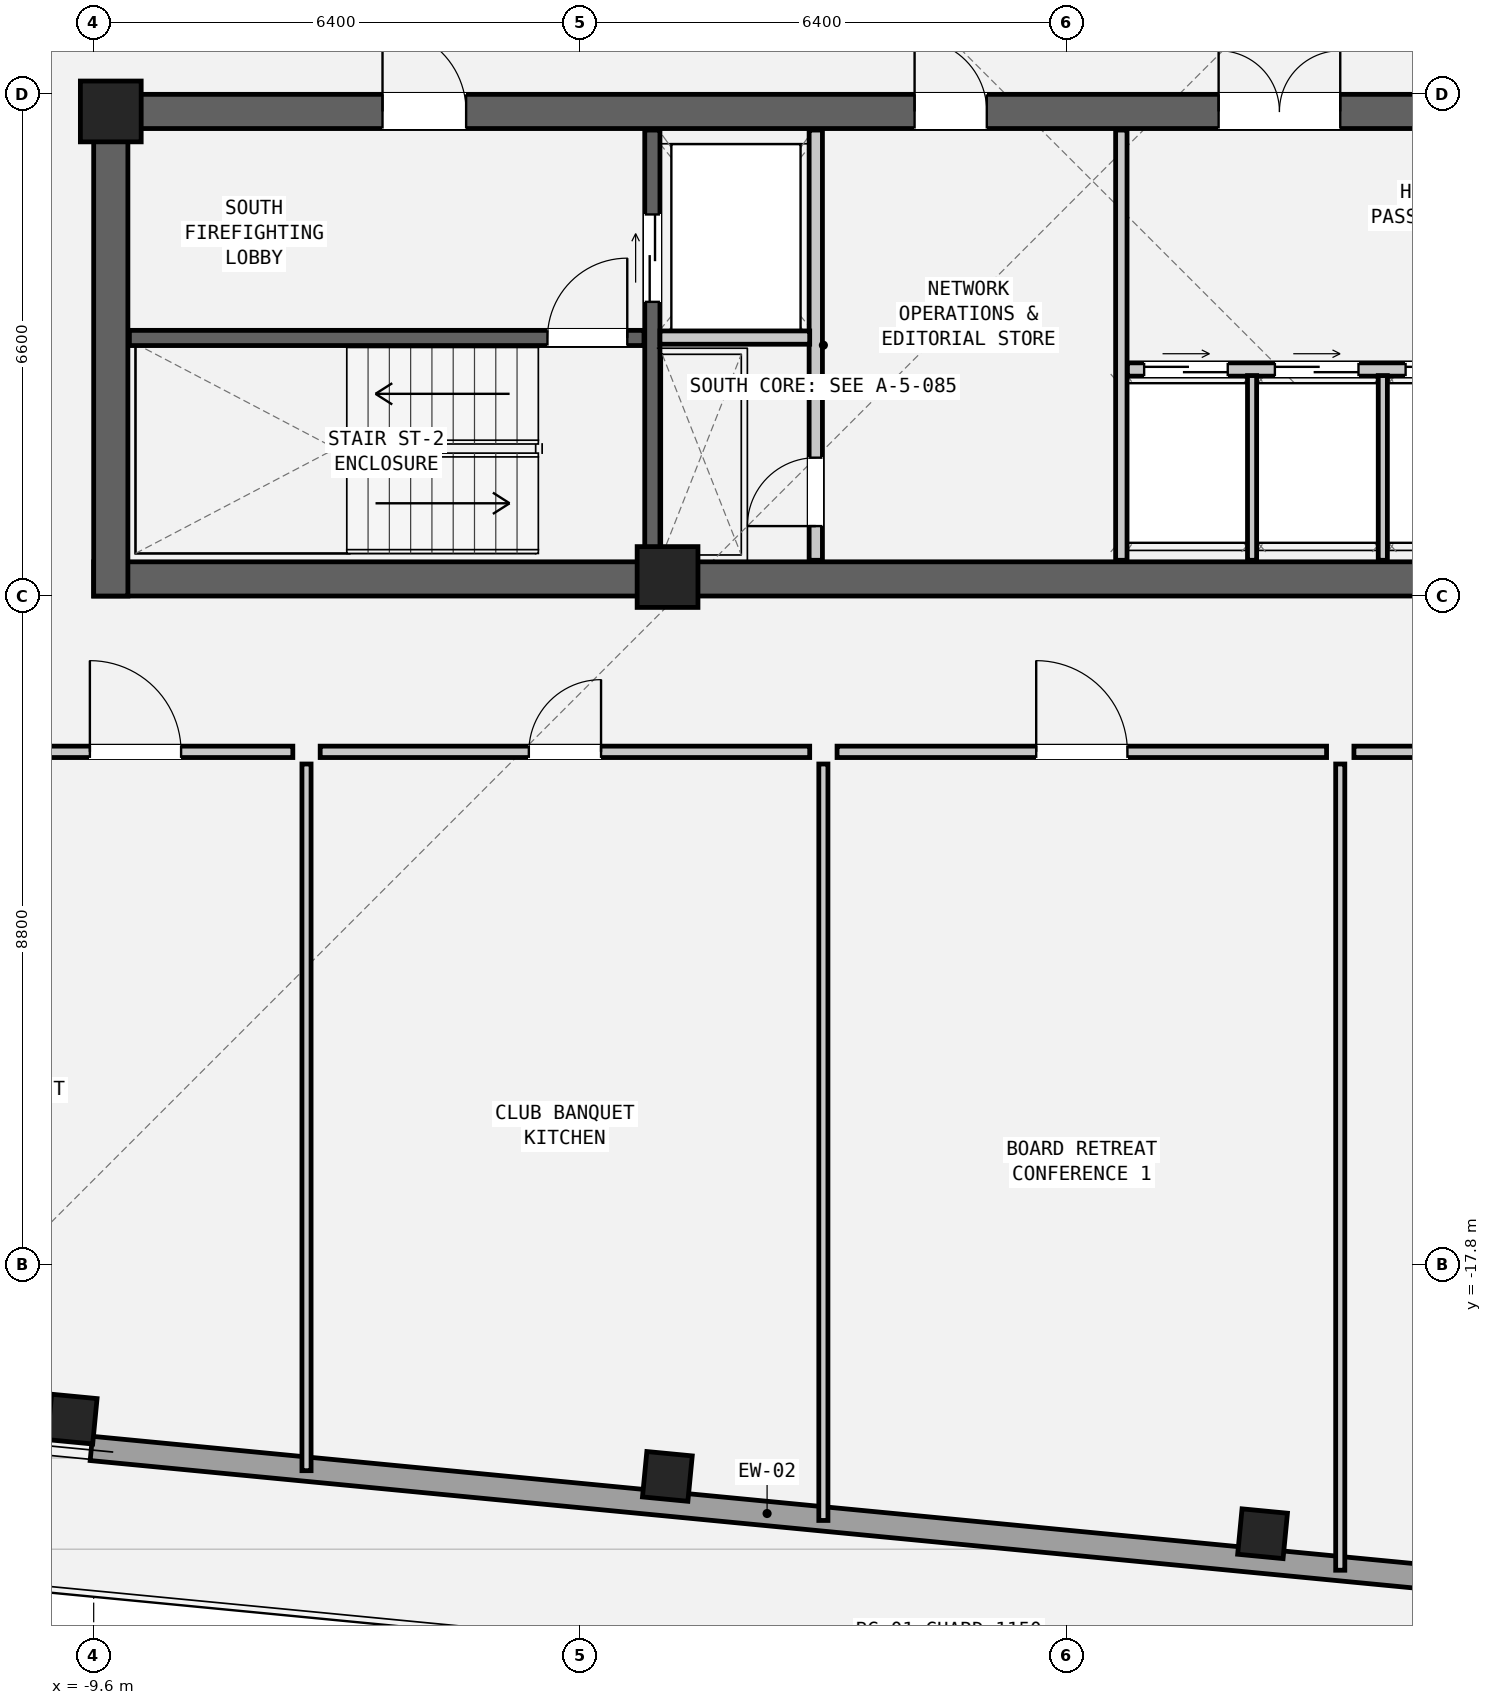
"""IFC4 building model, lengths in metres.
Left out: names, types, materials, properties, quantities, classifications, styles, units other than length and angle.
Written with IfcOpenShell. Run it as: python <this file> out.ifc"""

import sys

from ifc_helpers import new_model, si_unit, direction, frame, frame_2d, origin, origin_2d, place, context, subcontext, project, spatial, rectangle, hollow_rectangle, extrude, element, fill, save


model = new_model("IFC4")
c1 = context("Model", 3, precision=1e-05, world=origin(), true_north=direction((0.0, 1.0)))
c2 = subcontext(c1, "Body", "Model", "MODEL_VIEW")
j1 = project(units=[si_unit("LENGTHUNIT", "METRE"), si_unit("PLANEANGLEUNIT", "RADIAN")], contexts=[c1])
p1 = place(None, origin())
s1 = spatial("IfcSite", under=j1, at=p1, CompositionType="ELEMENT")
p2 = place(p1, origin())
s2 = spatial("IfcBuilding", under=s1, at=p2, CompositionType="ELEMENT")
p3 = place(p2, frame((0.0, 0.0, 276.95)))
s3 = spatial("IfcBuildingStorey", under=s2, at=p3, CompositionType="ELEMENT", Elevation=276.95)
p4 = place(p3, frame((-9.6, -8.775, 0.0), z_axis=(0.0, 0.0, 1.0), x_axis=(1.0, 0.0, 0.0)))
e1 = element("IfcWall", 1, at=p4, inside=s3, PredefinedType="SHEAR", context=c2, shape_type="SweptSolid", body=[
    extrude(rectangle(XDim=19.2, YDim=0.45, at=frame_2d((9.6, 0.0))), origin(), (0.0, 0.0, 1.0), 3.6),
])
p5 = place(p3, frame((-9.6, -2.625, 0.0), z_axis=(0.0, 0.0, 1.0), x_axis=(1.0, 0.0, 0.0)))
e2 = element("IfcWall", 2, at=p5, inside=s3, PredefinedType="SHEAR", context=c2, shape_type="SweptSolid", body=[
    extrude(rectangle(XDim=19.2, YDim=0.45, at=frame_2d((9.6, 0.0))), origin(), (0.0, 0.0, 1.0), 3.6),
])
p6 = place(p5, frame((3.8, 0.0, 0.0)))
e3 = element("IfcOpeningElement", 3, at=p6, cuts=e2, PredefinedType="OPENING", context=c2, shape_type="SweptSolid", body=[
    extrude(rectangle(XDim=1.1, YDim=2.08, at=frame_2d((0.55, 1.04))), frame((0.0, 0.237, 0.0), z_axis=(0.0, -1.0, 0.0), x_axis=(1.0, 0.0, 0.0)), (0.0, 0.0, 1.0), 0.474),
])
p7 = place(p5, frame((10.8, 0.0, 0.0)))
e4 = element("IfcOpeningElement", 4, at=p7, cuts=e2, PredefinedType="OPENING", context=c2, shape_type="SweptSolid", body=[
    extrude(rectangle(XDim=0.95, YDim=2.1, at=frame_2d((0.475, 1.05))), frame((0.0, 0.237, 0.0), z_axis=(0.0, -1.0, 0.0), x_axis=(1.0, 0.0, 0.0)), (0.0, 0.0, 1.0), 0.474),
])
p8 = place(p5, frame((14.8, 0.0, 0.0)))
e5 = element("IfcOpeningElement", 5, at=p8, cuts=e2, PredefinedType="OPENING", context=c2, shape_type="SweptSolid", body=[
    extrude(rectangle(XDim=1.6, YDim=2.12, at=frame_2d((0.8, 1.06))), frame((0.0, 0.237, 0.0), z_axis=(0.0, -1.0, 0.0), x_axis=(1.0, 0.0, 0.0)), (0.0, 0.0, 1.0), 0.474),
])
p9 = place(p3, frame((-9.375, -9.0, 0.0), z_axis=(0.0, 0.0, 1.0), x_axis=(0.0, 1.0, 0.0)))
e6 = element("IfcWall", 6, at=p9, inside=s3, PredefinedType="SHEAR", context=c2, shape_type="SweptSolid", body=[
    extrude(rectangle(XDim=6.6, YDim=0.45, at=frame_2d((3.3, 0.0))), origin(), (0.0, 0.0, 1.0), 3.6),
])
for number, where, z_axis, x_axis in (
    (7, (-9.883, -19.829, 0.0), (0.0, 0.0, 1.0), (0.995, -0.096, 0.0)),
    (8, (-2.052, -20.583, 0.0), (0.0, 0.0, 1.0), (0.995, -0.096, 0.0)),
    (9, (5.778, -21.336, 0.0), (0.0, 0.0, 1.0), (0.995, -0.096, 0.0)),
):
    element("IfcColumn", number, at=place(p3, frame(where, z_axis=z_axis, x_axis=x_axis)), inside=s3, PredefinedType="COLUMN", context=c2, shape_type="SweptSolid", body=[
        extrude(hollow_rectangle(XDim=0.6, YDim=0.6, WallThickness=0.04, at=origin_2d()), origin(), (0.0, 0.0, 1.0), 3.6),
    ])
for number, where, z_axis, x_axis in (
    (10, (-9.375, -2.625, 0.0), (0.0, 0.0, 1.0), (1.0, 0.0, 0.0)),
    (11, (-2.05, -8.75, 0.0), (0.0, 0.0, 1.0), (1.0, 0.0, 0.0)),
):
    element("IfcColumn", number, at=place(p3, frame(where, z_axis=z_axis, x_axis=x_axis)), inside=s3, PredefinedType="COLUMN", context=c2, shape_type="SweptSolid", body=[
        extrude(rectangle(XDim=0.8, YDim=0.8, at=origin_2d()), origin(), (0.0, 0.0, 1.0), 3.6),
    ])
p10 = place(p3, frame((13.287, -22.421, 0.0), z_axis=(0.0, 0.0, 1.0), x_axis=(-0.995396042099, 0.095847375411, 0.0)))
e12 = element("IfcWall", 12, at=p10, inside=s3, PredefinedType="SOLIDWALL", context=c2, shape_type="SweptSolid", body=[
    extrude(rectangle(XDim=23.024, YDim=0.32, at=frame_2d((11.512, 0.0))), origin(), (0.0, 0.0, 1.0), 2.984),
])
p11 = place(p10, frame((3.811, 0.0, 0.0)))
e13 = element("IfcOpeningElement", 13, at=p11, cuts=e12, PredefinedType="OPENING", context=c2, shape_type="SweptSolid", body=[
    extrude(rectangle(XDim=1.25, YDim=2.02, at=frame_2d((0.625, 1.01))), frame((0.0, 0.172, 0.0), z_axis=(0.0, -1.0, 0.0), x_axis=(1.0, 0.0, 0.0)), (0.0, 0.0, 1.0), 0.344),
])
p12 = place(p3, frame((-9.13, -5.605, 0.0), z_axis=(0.0, 0.0, 1.0), x_axis=(1.0, 0.0, 0.0)))
e14 = element("IfcWall", 14, at=p12, inside=s3, PredefinedType="SHEAR", context=c2, shape_type="SweptSolid", body=[
    extrude(rectangle(XDim=6.77, YDim=0.2, at=frame_2d((3.385, 0.0))), origin(), (0.0, 0.0, 1.0), 3.41),
])
p13 = place(p12, frame((5.5, 0.0, 0.0)))
e15 = element("IfcOpeningElement", 15, at=p13, cuts=e14, PredefinedType="OPENING", context=c2, shape_type="SweptSolid", body=[
    extrude(rectangle(XDim=1.05, YDim=2.08, at=frame_2d((0.525, 1.04))), frame((0.0, 0.112, 0.0), z_axis=(0.0, -1.0, 0.0), x_axis=(1.0, 0.0, 0.0)), (0.0, 0.0, 1.0), 0.224),
])
p14 = place(p3, frame((-2.25, -8.53, 0.0), z_axis=(0.0, 0.0, 1.0), x_axis=(0.0, 1.0, 0.0)))
e16 = element("IfcWall", 16, at=p14, inside=s3, PredefinedType="SHEAR", context=c2, shape_type="SweptSolid", body=[
    extrude(rectangle(XDim=5.66, YDim=0.2, at=frame_2d((2.83, 0.0))), origin(), (0.0, 0.0, 1.0), 3.41),
])
p15 = place(p14, frame((3.4, 0.0, 0.0)))
e17 = element("IfcOpeningElement", 17, at=p15, cuts=e16, PredefinedType="OPENING", context=c2, shape_type="SweptSolid", body=[
    extrude(rectangle(XDim=1.15, YDim=2.08, at=frame_2d((0.575, 1.04))), frame((0.0, 0.112, 0.0), z_axis=(0.0, -1.0, 0.0), x_axis=(1.0, 0.0, 0.0)), (0.0, 0.0, 1.0), 0.224),
])
p16 = place(p3, frame((-0.1, -8.53, 0.0), z_axis=(0.0, 0.0, 1.0), x_axis=(0.0, 1.0, 0.0)))
e18 = element("IfcWall", 18, at=p16, inside=s3, PredefinedType="PARTITIONING", context=c2, shape_type="SweptSolid", body=[
    extrude(rectangle(XDim=5.66, YDim=0.175, at=frame_2d((2.83, 0.0))), origin(), (0.0, 0.0, 1.0), 3.41),
])
p17 = place(p16, frame((0.45, 0.0, 0.0)))
e19 = element("IfcOpeningElement", 19, at=p17, cuts=e18, PredefinedType="OPENING", context=c2, shape_type="SweptSolid", body=[
    extrude(rectangle(XDim=0.9, YDim=2.05, at=frame_2d((0.45, 1.025))), frame((0.0, 0.1, 0.0), z_axis=(0.0, -1.0, 0.0), x_axis=(1.0, 0.0, 0.0)), (0.0, 0.0, 1.0), 0.199),
])
p18 = place(p3, frame((-2.15, -5.6, 0.0), z_axis=(0.0, 0.0, 1.0), x_axis=(1.0, 0.0, 0.0)))
e20 = element("IfcWall", 20, at=p18, inside=s3, PredefinedType="PARTITIONING", context=c2, shape_type="SweptSolid", body=[
    extrude(rectangle(XDim=1.97, YDim=0.175, at=frame_2d((0.985, 0.0))), origin(), (0.0, 0.0, 1.0), 3.41),
])
p19 = place(p3, frame((3.92, -8.53, 0.0), z_axis=(0.0, 0.0, 1.0), x_axis=(0.0, 1.0, 0.0)))
e21 = element("IfcWall", 21, at=p19, inside=s3, PredefinedType="PARTITIONING", context=c2, shape_type="SweptSolid", body=[
    extrude(rectangle(XDim=5.66, YDim=0.15, at=frame_2d((2.83, 0.0))), origin(), (0.0, 0.0, 1.0), 3.41),
])
p20 = place(p3, frame((4.0, -6.02, 0.0), z_axis=(0.0, 0.0, 1.0), x_axis=(1.0, 0.0, 0.0)))
e22 = element("IfcWall", 22, at=p20, inside=s3, PredefinedType="PARTITIONING", context=c2, shape_type="SweptSolid", body=[
    extrude(rectangle(XDim=5.13, YDim=0.175, at=frame_2d((2.565, 0.0))), origin(), (0.0, 0.0, 1.0), 3.41),
])
p21 = place(p20, frame((0.22, 0.0, 0.0)))
e23 = element("IfcOpeningElement", 23, at=p21, cuts=e22, PredefinedType="OPENING", context=c2, shape_type="SweptSolid", body=[
    extrude(rectangle(XDim=1.1, YDim=2.06, at=frame_2d((0.55, 1.03))), frame((0.0, 0.1, 0.0), z_axis=(0.0, -1.0, 0.0), x_axis=(1.0, 0.0, 0.0)), (0.0, 0.0, 1.0), 0.199),
])
p22 = place(p20, frame((1.94, 0.0, 0.0)))
e24 = element("IfcOpeningElement", 24, at=p22, cuts=e22, PredefinedType="OPENING", context=c2, shape_type="SweptSolid", body=[
    extrude(rectangle(XDim=1.1, YDim=2.06, at=frame_2d((0.55, 1.03))), frame((0.0, 0.1, 0.0), z_axis=(0.0, -1.0, 0.0), x_axis=(1.0, 0.0, 0.0)), (0.0, 0.0, 1.0), 0.199),
])
p23 = place(p20, frame((3.66, 0.0, 0.0)))
e25 = element("IfcOpeningElement", 25, at=p23, cuts=e22, PredefinedType="OPENING", context=c2, shape_type="SweptSolid", body=[
    extrude(rectangle(XDim=1.1, YDim=2.06, at=frame_2d((0.55, 1.03))), frame((0.0, 0.1, 0.0), z_axis=(0.0, -1.0, 0.0), x_axis=(1.0, 0.0, 0.0)), (0.0, 0.0, 1.0), 0.199),
])
for number, where, z_axis, x_axis in (
    (26, (5.64, -8.53, 0.0), (0.0, 0.0, 1.0), (0.0, 1.0, 0.0)),
    (27, (7.36, -8.53, 0.0), (0.0, 0.0, 1.0), (0.0, 1.0, 0.0)),
):
    element("IfcWall", number, at=place(p3, frame(where, z_axis=z_axis, x_axis=x_axis)), inside=s3, PredefinedType="PARTITIONING", context=c2, shape_type="SweptSolid", body=[
        extrude(rectangle(XDim=2.43, YDim=0.12, at=frame_2d((1.215, 0.0))), origin(), (0.0, 0.0, 1.0), 3.41),
    ])
p24 = place(p3, frame((-6.8, -20.507, 0.0), z_axis=(0.0, 0.0, 1.0), x_axis=(0.0, 1.0, 0.0)))
e28 = element("IfcWall", 28, at=p24, inside=s3, PredefinedType="PARTITIONING", context=c2, shape_type="SweptSolid", body=[
    extrude(rectangle(XDim=9.297, YDim=0.12, at=frame_2d((4.648, 0.0))), origin(), (0.0, 0.0, 1.0), 3.41),
])
p25 = place(p3, frame((0.0, -21.162, 0.0), z_axis=(0.0, 0.0, 1.0), x_axis=(0.0, 1.0, 0.0)))
e29 = element("IfcWall", 29, at=p25, inside=s3, PredefinedType="PARTITIONING", context=c2, shape_type="SweptSolid", body=[
    extrude(rectangle(XDim=9.952, YDim=0.12, at=frame_2d((4.976, 0.0))), origin(), (0.0, 0.0, 1.0), 2.931),
])
p26 = place(p3, frame((6.8, -21.817, 0.0), z_axis=(0.0, 0.0, 1.0), x_axis=(0.0, 1.0, 0.0)))
e30 = element("IfcWall", 30, at=p26, inside=s3, PredefinedType="PARTITIONING", context=c2, shape_type="SweptSolid", body=[
    extrude(rectangle(XDim=10.607, YDim=0.12, at=frame_2d((5.303, 0.0))), origin(), (0.0, 0.0, 1.0), 3.41),
])
p27 = place(p3, frame((-11.12, -11.05, 0.0), z_axis=(0.0, 0.0, 1.0), x_axis=(1.0, 0.0, 0.0)))
e31 = element("IfcWall", 31, at=p27, inside=s3, PredefinedType="PARTITIONING", context=c2, shape_type="SweptSolid", body=[
    extrude(rectangle(XDim=4.14, YDim=0.15, at=frame_2d((2.07, 0.0))), origin(), (0.0, 0.0, 1.0), 3.41),
])
p28 = place(p27, frame((1.47, 0.0, 0.0)))
e32 = element("IfcOpeningElement", 32, at=p28, cuts=e31, PredefinedType="OPENING", context=c2, shape_type="SweptSolid", body=[
    extrude(rectangle(XDim=1.2, YDim=2.1, at=frame_2d((0.6, 1.05))), frame((0.0, 0.087, 0.0), z_axis=(0.0, -1.0, 0.0), x_axis=(1.0, 0.0, 0.0)), (0.0, 0.0, 1.0), 0.174),
])
p29 = place(p3, frame((-6.62, -11.05, 0.0), z_axis=(0.0, 0.0, 1.0), x_axis=(1.0, 0.0, 0.0)))
e33 = element("IfcWall", 33, at=p29, inside=s3, PredefinedType="PARTITIONING", context=c2, shape_type="SweptSolid", body=[
    extrude(rectangle(XDim=6.44, YDim=0.15, at=frame_2d((3.22, 0.0))), origin(), (0.0, 0.0, 1.0), 3.41),
])
p30 = place(p29, frame((2.745, 0.0, 0.0)))
e34 = element("IfcOpeningElement", 34, at=p30, cuts=e33, PredefinedType="OPENING", context=c2, shape_type="SweptSolid", body=[
    extrude(rectangle(XDim=0.95, YDim=2.1, at=frame_2d((0.475, 1.05))), frame((0.0, 0.087, 0.0), z_axis=(0.0, -1.0, 0.0), x_axis=(1.0, 0.0, 0.0)), (0.0, 0.0, 1.0), 0.174),
])
p31 = place(p3, frame((0.18, -11.05, 0.0), z_axis=(0.0, 0.0, 1.0), x_axis=(1.0, 0.0, 0.0)))
e35 = element("IfcWall", 35, at=p31, inside=s3, PredefinedType="PARTITIONING", context=c2, shape_type="SweptSolid", body=[
    extrude(rectangle(XDim=6.44, YDim=0.15, at=frame_2d((3.22, 0.0))), origin(), (0.0, 0.0, 1.0), 3.41),
])
p32 = place(p31, frame((2.62, 0.0, 0.0)))
e36 = element("IfcOpeningElement", 36, at=p32, cuts=e35, PredefinedType="OPENING", context=c2, shape_type="SweptSolid", body=[
    extrude(rectangle(XDim=1.2, YDim=2.1, at=frame_2d((0.6, 1.05))), frame((0.0, 0.087, 0.0), z_axis=(0.0, -1.0, 0.0), x_axis=(1.0, 0.0, 0.0)), (0.0, 0.0, 1.0), 0.174),
])
p33 = place(p3, frame((6.98, -11.05, 0.0), z_axis=(0.0, 0.0, 1.0), x_axis=(1.0, 0.0, 0.0)))
e37 = element("IfcWall", 37, at=p33, inside=s3, PredefinedType="PARTITIONING", context=c2, shape_type="SweptSolid", body=[
    extrude(rectangle(XDim=4.49, YDim=0.15, at=frame_2d((2.245, 0.0))), origin(), (0.0, 0.0, 1.0), 3.41),
])
p34 = place(p33, frame((1.645, 0.0, 0.0)))
e38 = element("IfcOpeningElement", 38, at=p34, cuts=e37, PredefinedType="OPENING", context=c2, shape_type="SweptSolid", body=[
    extrude(rectangle(XDim=1.2, YDim=2.1, at=frame_2d((0.6, 1.05))), frame((0.0, 0.087, 0.0), z_axis=(0.0, -1.0, 0.0), x_axis=(1.0, 0.0, 0.0)), (0.0, 0.0, 1.0), 0.174),
])
p35 = place(p13, origin())
e39 = element("IfcDoor", 39, at=p35, inside=s3, OperationType="SINGLE_SWING_RIGHT", PredefinedType="DOOR", context=c2, shape_type="SweptSolid", body=[
    extrude(rectangle(XDim=1.05, YDim=2.08, at=frame_2d((0.525, 1.04))), frame((0.0, 0.025, 0.0), z_axis=(0.0, -1.0, 0.0), x_axis=(1.0, 0.0, 0.0)), (0.0, 0.0, 1.0), 0.05),
])
fill(e15, e39)
p36 = place(p6, origin())
e40 = element("IfcDoor", 40, at=p36, inside=s3, OperationType="SINGLE_SWING_LEFT", PredefinedType="DOOR", context=c2, shape_type="SweptSolid", body=[
    extrude(rectangle(XDim=1.1, YDim=2.08, at=frame_2d((0.55, 1.04))), frame((0.0, 0.025, 0.0), z_axis=(0.0, -1.0, 0.0), x_axis=(1.0, 0.0, 0.0)), (0.0, 0.0, 1.0), 0.05),
])
fill(e3, e40)
p37 = place(p15, origin())
e41 = element("IfcDoor", 41, at=p37, inside=s3, OperationType="DOUBLE_DOOR_SLIDING", PredefinedType="DOOR", context=c2, shape_type="SweptSolid", body=[
    extrude(rectangle(XDim=1.15, YDim=2.08, at=frame_2d((0.575, 1.04))), frame((0.0, 0.025, 0.0), z_axis=(0.0, -1.0, 0.0), x_axis=(1.0, 0.0, 0.0)), (0.0, 0.0, 1.0), 0.05),
])
fill(e17, e41)
p38 = place(p17, origin())
e42 = element("IfcDoor", 42, at=p38, inside=s3, OperationType="SINGLE_SWING_LEFT", PredefinedType="DOOR", context=c2, shape_type="SweptSolid", body=[
    extrude(rectangle(XDim=0.9, YDim=2.05, at=frame_2d((0.45, 1.025))), frame((0.0, 0.025, 0.0), z_axis=(0.0, -1.0, 0.0), x_axis=(1.0, 0.0, 0.0)), (0.0, 0.0, 1.0), 0.05),
])
fill(e19, e42)
p39 = place(p7, origin())
e43 = element("IfcDoor", 43, at=p39, inside=s3, OperationType="SINGLE_SWING_LEFT", PredefinedType="DOOR", context=c2, shape_type="SweptSolid", body=[
    extrude(rectangle(XDim=0.95, YDim=2.1, at=frame_2d((0.475, 1.05))), frame((0.0, 0.025, 0.0), z_axis=(0.0, -1.0, 0.0), x_axis=(1.0, 0.0, 0.0)), (0.0, 0.0, 1.0), 0.05),
])
fill(e4, e43)
p40 = place(p21, origin())
e44 = element("IfcDoor", 44, at=p40, inside=s3, OperationType="DOUBLE_DOOR_SLIDING", PredefinedType="DOOR", context=c2, shape_type="SweptSolid", body=[
    extrude(rectangle(XDim=1.1, YDim=2.06, at=frame_2d((0.55, 1.03))), frame((0.0, 0.025, 0.0), z_axis=(0.0, -1.0, 0.0), x_axis=(1.0, 0.0, 0.0)), (0.0, 0.0, 1.0), 0.05),
])
fill(e23, e44)
p41 = place(p22, origin())
e45 = element("IfcDoor", 45, at=p41, inside=s3, OperationType="DOUBLE_DOOR_SLIDING", PredefinedType="DOOR", context=c2, shape_type="SweptSolid", body=[
    extrude(rectangle(XDim=1.1, YDim=2.06, at=frame_2d((0.55, 1.03))), frame((0.0, 0.025, 0.0), z_axis=(0.0, -1.0, 0.0), x_axis=(1.0, 0.0, 0.0)), (0.0, 0.0, 1.0), 0.05),
])
fill(e24, e45)
p42 = place(p23, origin())
e46 = element("IfcDoor", 46, at=p42, inside=s3, OperationType="DOUBLE_DOOR_SLIDING", PredefinedType="DOOR", context=c2, shape_type="SweptSolid", body=[
    extrude(rectangle(XDim=1.1, YDim=2.06, at=frame_2d((0.55, 1.03))), frame((0.0, 0.025, 0.0), z_axis=(0.0, -1.0, 0.0), x_axis=(1.0, 0.0, 0.0)), (0.0, 0.0, 1.0), 0.05),
])
fill(e25, e46)
p43 = place(p8, origin())
e47 = element("IfcDoor", 47, at=p43, inside=s3, OperationType="DOUBLE_DOOR_SINGLE_SWING", PredefinedType="DOOR", context=c2, shape_type="SweptSolid", body=[
    extrude(rectangle(XDim=1.6, YDim=2.12, at=frame_2d((0.8, 1.06))), frame((0.0, 0.025, 0.0), z_axis=(0.0, -1.0, 0.0), x_axis=(1.0, 0.0, 0.0)), (0.0, 0.0, 1.0), 0.05),
])
fill(e5, e47)
p44 = place(p28, origin())
e48 = element("IfcDoor", 48, at=p44, inside=s3, OperationType="SINGLE_SWING_LEFT", PredefinedType="DOOR", context=c2, shape_type="SweptSolid", body=[
    extrude(rectangle(XDim=1.2, YDim=2.1, at=frame_2d((0.6, 1.05))), frame((0.0, 0.025, 0.0), z_axis=(0.0, -1.0, 0.0), x_axis=(1.0, 0.0, 0.0)), (0.0, 0.0, 1.0), 0.05),
])
fill(e32, e48)
p45 = place(p30, origin())
e49 = element("IfcDoor", 49, at=p45, inside=s3, OperationType="SINGLE_SWING_RIGHT", PredefinedType="DOOR", context=c2, shape_type="SweptSolid", body=[
    extrude(rectangle(XDim=0.95, YDim=2.1, at=frame_2d((0.475, 1.05))), frame((0.0, 0.025, 0.0), z_axis=(0.0, -1.0, 0.0), x_axis=(1.0, 0.0, 0.0)), (0.0, 0.0, 1.0), 0.05),
])
fill(e34, e49)
p46 = place(p32, origin())
e50 = element("IfcDoor", 50, at=p46, inside=s3, OperationType="SINGLE_SWING_LEFT", PredefinedType="DOOR", context=c2, shape_type="SweptSolid", body=[
    extrude(rectangle(XDim=1.2, YDim=2.1, at=frame_2d((0.6, 1.05))), frame((0.0, 0.025, 0.0), z_axis=(0.0, -1.0, 0.0), x_axis=(1.0, 0.0, 0.0)), (0.0, 0.0, 1.0), 0.05),
])
fill(e36, e50)
save(model, sys.argv[1])
